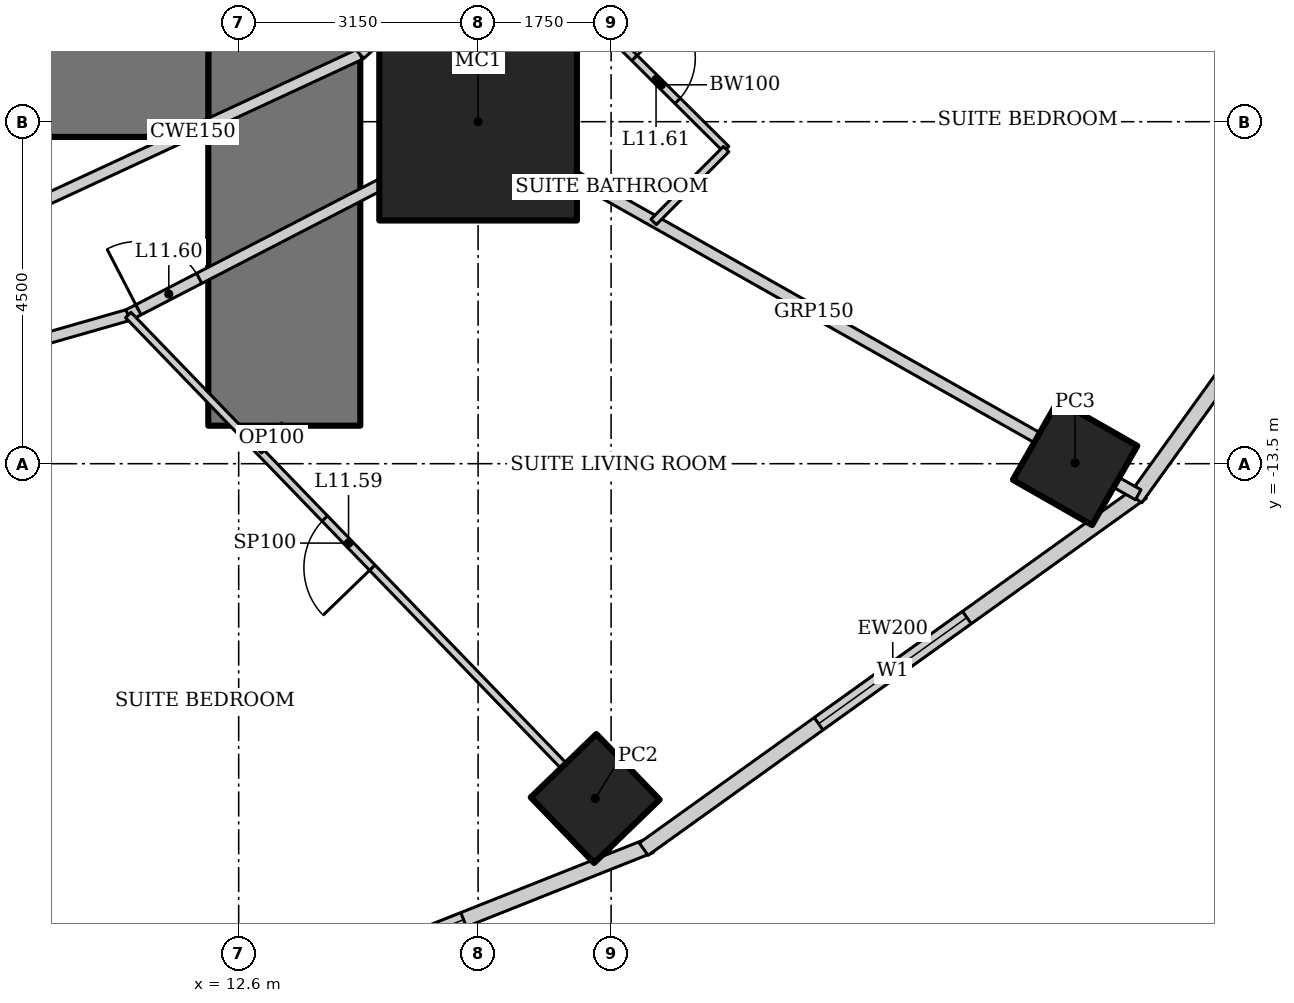
"""IFC4 building model, lengths in metres.
Left out: names, types, materials, properties, quantities, classifications, styles, units other than length and angle.
Written with IfcOpenShell. Run it as: python <this file> out.ifc"""

import sys

from ifc_helpers import new_model, si_unit, direction, frame, frame_2d, origin, origin_2d, place, context, subcontext, project, spatial, rectangle, hollow_rectangle, extrude, element, fill, save


model = new_model("IFC4")
c1 = context("Model", 3, precision=1e-05, world=origin(), true_north=direction((0.0, 1.0)))
c2 = subcontext(c1, "Body", "Model", "MODEL_VIEW")
j1 = project(units=[si_unit("LENGTHUNIT", "METRE"), si_unit("PLANEANGLEUNIT", "RADIAN")], contexts=[c1])
p1 = place(None, origin())
s1 = spatial("IfcSite", under=j1, at=p1, CompositionType="ELEMENT")
p2 = place(p1, origin())
s2 = spatial("IfcBuilding", under=s1, at=p2, CompositionType="ELEMENT")
p3 = place(p2, frame((0.0, 0.0, 55.0)))
s3 = spatial("IfcBuildingStorey", under=s2, at=p3, CompositionType="ELEMENT", Elevation=55.0)
p4 = place(p3, frame((15.75, -9.0, 0.0), z_axis=(0.0, 0.0, 1.0), x_axis=(1.0, 0.0, 0.0)))
e1 = element("IfcColumn", 1, at=p4, inside=s3, PredefinedType="COLUMN", context=c2, shape_type="SweptSolid", body=[
    extrude(hollow_rectangle(XDim=2.6, YDim=2.6, WallThickness=0.13, at=origin_2d()), origin(), (0.0, 0.0, 1.0), 3.6),
])
p5 = place(p3, frame((17.291, -17.905, 0.0), z_axis=(0.0, 0.0, 1.0), x_axis=(0.719339800339, 0.694658370459, 0.0)))
e2 = element("IfcColumn", 2, at=p5, inside=s3, PredefinedType="COLUMN", context=c2, shape_type="SweptSolid", body=[
    extrude(hollow_rectangle(XDim=1.2, YDim=1.2, WallThickness=0.1, at=origin_2d()), origin(), (0.0, 0.0, 1.0), 3.6),
])
p6 = place(p3, frame((23.605, -13.489, 0.0), z_axis=(0.0, 0.0, 1.0), x_axis=(0.496139221777, 0.86824298017, 0.0)))
e3 = element("IfcColumn", 3, at=p6, inside=s3, PredefinedType="COLUMN", context=c2, shape_type="SweptSolid", body=[
    extrude(hollow_rectangle(XDim=1.2, YDim=1.2, WallThickness=0.12, at=origin_2d()), origin(), (0.0, 0.0, 1.0), 3.6),
])
p7 = place(p3, frame((13.2, -13.0, 0.0), z_axis=(0.0, 0.0, 1.0), x_axis=(0.0, 1.0, 0.0)))
e4 = element("IfcWall", 4, at=p7, inside=s3, PredefinedType="SHEAR", context=c2, shape_type="SweptSolid", body=[
    extrude(rectangle(XDim=26.0, YDim=2.0, at=frame_2d((13.0, 0.0))), origin(), (0.0, 0.0, 1.0), 3.6),
])
p8 = place(p7, frame((12.1, 0.0, 0.0)))
e5 = element("IfcOpeningElement", 5, at=p8, cuts=e4, PredefinedType="OPENING", context=c2, shape_type="SweptSolid", body=[
    extrude(rectangle(XDim=1.8, YDim=2.1, at=frame_2d((0.9, 1.05))), frame((0.0, 1.01, 0.0), z_axis=(0.0, -1.0, 0.0), x_axis=(1.0, 0.0, 0.0)), (0.0, 0.0, 1.0), 2.02),
])
p9 = place(p3, frame((-12.2, -8.0, 0.0), z_axis=(0.0, 0.0, 1.0), x_axis=(1.0, 0.0, 0.0)))
e6 = element("IfcWall", 6, at=p9, inside=s3, PredefinedType="SHEAR", context=c2, shape_type="SweptSolid", body=[
    extrude(rectangle(XDim=24.4, YDim=2.4, at=frame_2d((12.2, 0.0))), origin(), (0.0, 0.0, 1.0), 3.6),
])
p10 = place(p3, frame((10.869, -21.363, 0.0), z_axis=(0.0, 0.0, 1.0), x_axis=(0.929358351251, 0.369178892895, 0.0)))
e7 = element("IfcWall", 7, at=p10, inside=s3, PredefinedType="SOLIDWALL", context=c2, shape_type="SweptSolid", body=[
    extrude(rectangle(XDim=7.692, YDim=0.2, at=frame_2d((3.846, 0.0))), origin(), (0.0, 0.0, 1.0), 3.45),
])
p11 = place(p10, frame((2.646, 0.0, 0.5)))
e8 = element("IfcOpeningElement", 8, at=p11, cuts=e7, PredefinedType="OPENING", context=c2, shape_type="SweptSolid", body=[
    extrude(rectangle(XDim=2.4, YDim=2.2, at=frame_2d((1.2, 1.1))), frame((0.0, 0.11, 0.0), z_axis=(0.0, -1.0, 0.0), x_axis=(1.0, 0.0, 0.0)), (0.0, 0.0, 1.0), 0.22),
])
p12 = place(p3, frame((17.929, -18.572, 0.0), z_axis=(0.0, 0.0, 1.0), x_axis=(0.812791321576, 0.582554948112, 0.0)))
e9 = element("IfcWall", 9, at=p12, inside=s3, PredefinedType="SOLIDWALL", context=c2, shape_type="SweptSolid", body=[
    extrude(rectangle(XDim=8.063, YDim=0.2, at=frame_2d((4.032, 0.0))), origin(), (0.0, 0.0, 1.0), 3.45),
])
p13 = place(p12, frame((2.832, 0.0, 0.5)))
e10 = element("IfcOpeningElement", 10, at=p13, cuts=e9, PredefinedType="OPENING", context=c2, shape_type="SweptSolid", body=[
    extrude(rectangle(XDim=2.4, YDim=2.2, at=frame_2d((1.2, 1.1))), frame((0.0, 0.11, 0.0), z_axis=(0.0, -1.0, 0.0), x_axis=(1.0, 0.0, 0.0)), (0.0, 0.0, 1.0), 0.22),
])
p14 = place(p3, frame((24.4, -13.957, 0.0), z_axis=(0.0, 0.0, 1.0), x_axis=(0.583937613703, 0.811798536155, 0.0)))
e11 = element("IfcWall", 11, at=p14, inside=s3, PredefinedType="SOLIDWALL", context=c2, shape_type="SweptSolid", body=[
    extrude(rectangle(XDim=8.323, YDim=0.2, at=frame_2d((4.162, 0.0))), origin(), (0.0, 0.0, 1.0), 3.45),
])
p15 = place(p14, frame((2.961, 0.0, 0.5)))
e12 = element("IfcOpeningElement", 12, at=p15, cuts=e11, PredefinedType="OPENING", context=c2, shape_type="SweptSolid", body=[
    extrude(rectangle(XDim=2.4, YDim=2.2, at=frame_2d((1.2, 1.1))), frame((0.0, 0.11, 0.0), z_axis=(0.0, -1.0, 0.0), x_axis=(1.0, 0.0, 0.0)), (0.0, 0.0, 1.0), 0.22),
])
p16 = place(p3, frame((10.912, -21.346, 0.0), z_axis=(0.0, 0.0, 1.0), x_axis=(-0.456950233066, 0.889492262193, 0.0)))
e13 = element("IfcWall", 13, at=p16, inside=s3, PredefinedType="PARTITIONING", context=c2, shape_type="SweptSolid", body=[
    extrude(rectangle(XDim=9.542, YDim=0.15, at=frame_2d((4.771, 0.0))), origin(), (0.0, 0.0, 1.0), 2.528),
])
p17 = place(p3, frame((24.435, -13.909, 0.0), z_axis=(0.0, 0.0, 1.0), x_axis=(-0.870612006791, 0.491970256856, 0.0)))
e14 = element("IfcWall", 14, at=p17, inside=s3, PredefinedType="PARTITIONING", context=c2, shape_type="SweptSolid", body=[
    extrude(rectangle(XDim=9.802, YDim=0.15, at=frame_2d((4.901, 0.0))), origin(), (0.0, 0.0, 1.0), 2.693),
])
p18 = place(p3, frame((6.552, -12.858, 0.0), z_axis=(0.0, 0.0, 1.0), x_axis=(0.961464178199, 0.27493023486, 0.0)))
e15 = element("IfcWall", 15, at=p18, inside=s3, PredefinedType="PARTITIONING", context=c2, shape_type="SweptSolid", body=[
    extrude(rectangle(XDim=4.78, YDim=0.15, at=frame_2d((2.39, 0.0))), origin(), (0.0, 0.0, 1.0), 3.45),
])
p19 = place(p3, frame((11.147, -11.544, 0.0), z_axis=(0.0, 0.0, 1.0), x_axis=(0.888333171507, 0.459199495209, 0.0)))
e16 = element("IfcWall", 16, at=p19, inside=s3, PredefinedType="PARTITIONING", context=c2, shape_type="SweptSolid", body=[
    extrude(rectangle(XDim=5.351, YDim=0.15, at=frame_2d((2.676, 0.0))), origin(), (0.0, 0.0, 1.0), 3.45),
])
p20 = place(p19, frame((0.15, 0.0, 0.0)))
e17 = element("IfcOpeningElement", 17, at=p20, cuts=e16, PredefinedType="OPENING", context=c2, shape_type="SweptSolid", body=[
    extrude(rectangle(XDim=0.9, YDim=2.1, at=frame_2d((0.45, 1.05))), frame((0.0, 0.085, 0.0), z_axis=(0.0, -1.0, 0.0), x_axis=(1.0, 0.0, 0.0)), (0.0, 0.0, 1.0), 0.17),
])
p21 = place(p3, frame((15.901, -9.086, 0.0), z_axis=(0.0, 0.0, 1.0), x_axis=(0.705121546414, 0.709086457904, 0.0)))
e18 = element("IfcWall", 18, at=p21, inside=s3, PredefinedType="PARTITIONING", context=c2, shape_type="SweptSolid", body=[
    extrude(rectangle(XDim=5.788, YDim=0.15, at=frame_2d((2.894, 0.0))), origin(), (0.0, 0.0, 1.0), 3.45),
])
p22 = place(p3, frame((9.801, -10.149, 0.0), z_axis=(0.0, 0.0, 1.0), x_axis=(0.907279653965, 0.420527798727, 0.0)))
e19 = element("IfcWall", 19, at=p22, inside=s3, PredefinedType="PARTITIONING", context=c2, shape_type="SweptSolid", body=[
    extrude(rectangle(XDim=4.844, YDim=0.15, at=frame_2d((2.422, 0.0))), origin(), (0.0, 0.0, 1.0), 3.45),
])
p23 = place(p3, frame((14.196, -8.112, 0.0), z_axis=(0.0, 0.0, 1.0), x_axis=(0.742194222, 0.670184852731, 0.0)))
e20 = element("IfcWall", 20, at=p23, inside=s3, PredefinedType="PARTITIONING", context=c2, shape_type="SweptSolid", body=[
    extrude(rectangle(XDim=5.347, YDim=0.15, at=frame_2d((2.673, 0.0))), origin(), (0.0, 0.0, 1.0), 3.45),
])
p24 = place(p23, frame((2.173, 0.0, 0.0)))
e21 = element("IfcOpeningElement", 21, at=p24, cuts=e20, PredefinedType="OPENING", context=c2, shape_type="SweptSolid", body=[
    extrude(rectangle(XDim=1.0, YDim=2.1, at=frame_2d((0.5, 1.05))), frame((0.0, 0.085, 0.0), z_axis=(0.0, -1.0, 0.0), x_axis=(1.0, 0.0, 0.0)), (0.0, 0.0, 1.0), 0.17),
])
p25 = place(p3, frame((16.944, -17.545, 0.0), z_axis=(0.0, 0.0, 1.0), x_axis=(-0.694680670522, 0.71931826475, 0.0)))
e22 = element("IfcWall", 22, at=p25, inside=s3, PredefinedType="PARTITIONING", context=c2, shape_type="SweptSolid", body=[
    extrude(rectangle(XDim=8.344, YDim=0.1, at=frame_2d((4.172, 0.0))), origin(), (0.0, 0.0, 1.0), 2.528),
])
p26 = place(p25, frame((3.722, 0.0, 0.0)))
e23 = element("IfcOpeningElement", 23, at=p26, cuts=e22, PredefinedType="OPENING", context=c2, shape_type="SweptSolid", body=[
    extrude(rectangle(XDim=0.9, YDim=2.1, at=frame_2d((0.45, 1.05))), frame((0.0, 0.06, 0.0), z_axis=(0.0, -1.0, 0.0), x_axis=(1.0, 0.0, 0.0)), (0.0, 0.0, 1.0), 0.12),
])
p27 = place(p3, frame((17.311, -7.668, 0.0), z_axis=(0.0, 0.0, 1.0), x_axis=(0.709138392716, -0.705069315724, 0.0)))
e24 = element("IfcWall", 24, at=p27, inside=s3, PredefinedType="PARTITIONING", context=c2, shape_type="SweptSolid", body=[
    extrude(rectangle(XDim=2.4, YDim=0.1, at=frame_2d((1.2, 0.0))), origin(), (0.0, 0.0, 1.0), 3.45),
])
p28 = place(p27, frame((0.7, 0.0, 0.0)))
e25 = element("IfcOpeningElement", 25, at=p28, cuts=e24, PredefinedType="OPENING", context=c2, shape_type="SweptSolid", body=[
    extrude(rectangle(XDim=0.8, YDim=2.1, at=frame_2d((0.4, 1.05))), frame((0.0, 0.06, 0.0), z_axis=(0.0, -1.0, 0.0), x_axis=(1.0, 0.0, 0.0)), (0.0, 0.0, 1.0), 0.12),
])
p29 = place(p3, frame((19.013, -9.36, 0.0), z_axis=(0.0, 0.0, 1.0), x_axis=(-0.7051187611, -0.709089227633, 0.0)))
e26 = element("IfcWall", 26, at=p29, inside=s3, PredefinedType="PARTITIONING", context=c2, shape_type="SweptSolid", body=[
    extrude(rectangle(XDim=1.353, YDim=0.1, at=frame_2d((0.676, 0.0))), origin(), (0.0, 0.0, 1.0), 3.45),
])
p30 = place(p3, frame((13.2, -13.0, 0.0), z_axis=(0.0, 0.0, 1.0), x_axis=(-0.719347134512, -0.69465077562, 0.0)))
e27 = element("IfcWall", 27, at=p30, inside=s3, PredefinedType="PARTITIONING", context=c2, shape_type="SweptSolid", body=[
    extrude(rectangle(XDim=0.465, YDim=0.1, at=frame_2d((0.232, 0.0))), origin(), (0.0, 0.0, 1.0), 3.45),
])
p31 = place(p11, origin())
e28 = element("IfcWindow", 28, at=p31, inside=s3, PartitioningType="SINGLE_PANEL", PredefinedType="WINDOW", context=c2, shape_type="SweptSolid", body=[
    extrude(rectangle(XDim=2.4, YDim=2.2, at=frame_2d((1.2, 1.1))), frame((0.0, 0.03, 0.0), z_axis=(0.0, -1.0, 0.0), x_axis=(1.0, 0.0, 0.0)), (0.0, 0.0, 1.0), 0.06),
])
fill(e8, e28)
p32 = place(p13, origin())
e29 = element("IfcWindow", 29, at=p32, inside=s3, PartitioningType="SINGLE_PANEL", PredefinedType="WINDOW", context=c2, shape_type="SweptSolid", body=[
    extrude(rectangle(XDim=2.4, YDim=2.2, at=frame_2d((1.2, 1.1))), frame((0.0, 0.03, 0.0), z_axis=(0.0, -1.0, 0.0), x_axis=(1.0, 0.0, 0.0)), (0.0, 0.0, 1.0), 0.06),
])
fill(e10, e29)
p33 = place(p26, origin())
e30 = element("IfcDoor", 30, at=p33, inside=s3, OperationType="SINGLE_SWING_LEFT", PredefinedType="DOOR", context=c2, shape_type="SweptSolid", body=[
    extrude(rectangle(XDim=0.9, YDim=2.1, at=frame_2d((0.45, 1.05))), frame((0.0, 0.025, 0.0), z_axis=(0.0, -1.0, 0.0), x_axis=(1.0, 0.0, 0.0)), (0.0, 0.0, 1.0), 0.05),
])
fill(e23, e30)
p34 = place(p20, origin())
e31 = element("IfcDoor", 31, at=p34, inside=s3, OperationType="SINGLE_SWING_LEFT", PredefinedType="DOOR", context=c2, shape_type="SweptSolid", body=[
    extrude(rectangle(XDim=0.9, YDim=2.1, at=frame_2d((0.45, 1.05))), frame((0.0, 0.025, 0.0), z_axis=(0.0, -1.0, 0.0), x_axis=(1.0, 0.0, 0.0)), (0.0, 0.0, 1.0), 0.05),
])
fill(e17, e31)
p35 = place(p28, origin())
e32 = element("IfcDoor", 32, at=p35, inside=s3, OperationType="SINGLE_SWING_LEFT", PredefinedType="DOOR", context=c2, shape_type="SweptSolid", body=[
    extrude(rectangle(XDim=0.8, YDim=2.1, at=frame_2d((0.4, 1.05))), frame((0.0, 0.025, 0.0), z_axis=(0.0, -1.0, 0.0), x_axis=(1.0, 0.0, 0.0)), (0.0, 0.0, 1.0), 0.05),
])
fill(e25, e32)
save(model, sys.argv[1])
